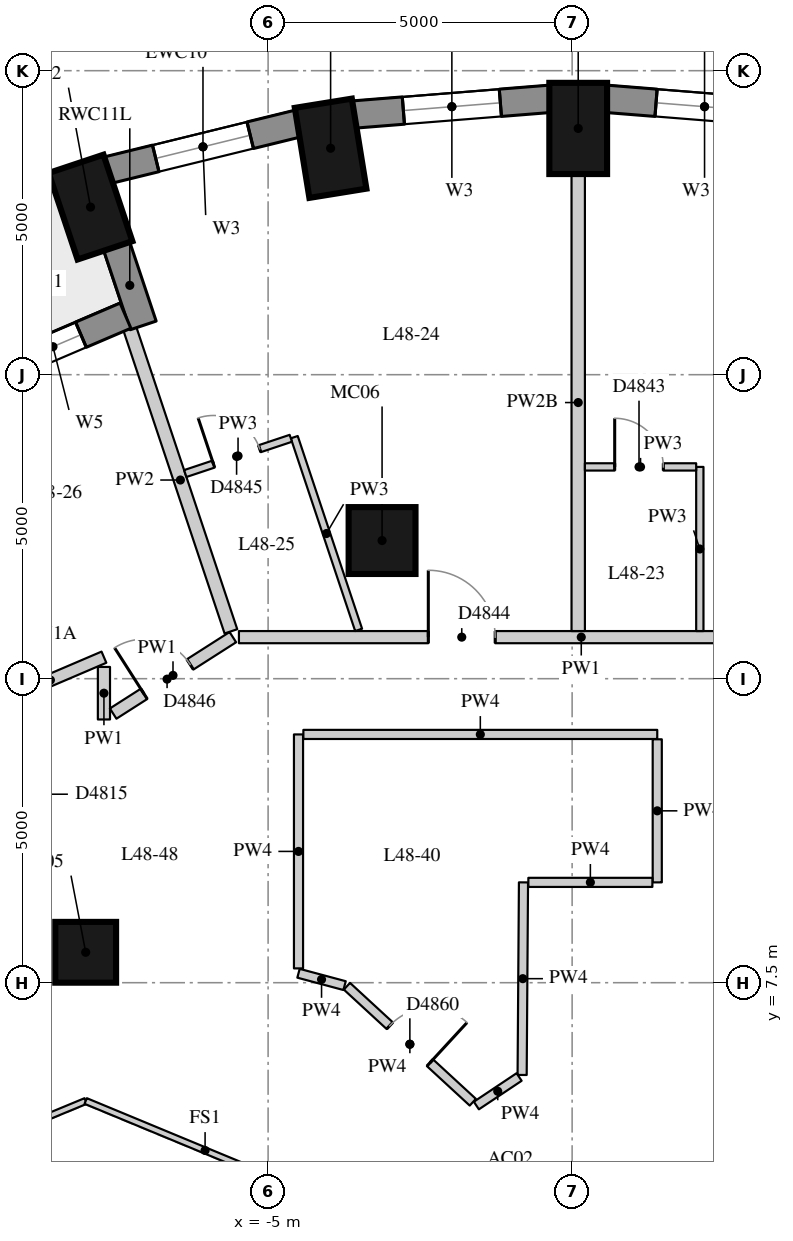
"""IFC4 building model, lengths in metres.
Left out: names, types, materials, properties, quantities, classifications, styles, units other than length and angle.
Written with IfcOpenShell. Run it as: python <this file> out.ifc"""

import sys

from ifc_helpers import new_model, si_unit, direction, frame, frame_2d, origin, origin_2d, place, context, subcontext, project, spatial, rectangle, extrude, element, fill, save


model = new_model("IFC4")
c1 = context("Model", 3, precision=1e-05, world=origin(), true_north=direction((0.0, 1.0)))
c2 = subcontext(c1, "Body", "Model", "MODEL_VIEW")
j1 = project(units=[si_unit("LENGTHUNIT", "METRE"), si_unit("PLANEANGLEUNIT", "RADIAN")], contexts=[c1])
p1 = place(None, origin())
s1 = spatial("IfcSite", under=j1, at=p1, CompositionType="ELEMENT")
p2 = place(p1, origin())
s2 = spatial("IfcBuilding", under=s1, at=p2, CompositionType="ELEMENT")
p3 = place(p2, frame((0.0, 0.0, 171.5)))
s3 = spatial("IfcBuildingStorey", under=s2, at=p3, CompositionType="ELEMENT", Elevation=171.5)
for number, where, z_axis, x_axis in (
    (1, (0.1, 21.55, 0.0), (0.0, 0.0, 1.0), (0.0, 1.0, 0.0)),
    (2, (-3.972, 21.224, 0.0), (0.0, 0.0, 1.0), (-0.16, 0.987, 0.0)),
    (3, (-7.92, 20.256, 0.0), (0.0, 0.0, 1.0), (-0.317, 0.949, 0.0)),
):
    element("IfcColumn", number, at=place(p3, frame(where, z_axis=z_axis, x_axis=x_axis)), inside=s3, PredefinedType="COLUMN", context=c2, shape_type="SweptSolid", body=[
        extrude(rectangle(XDim=1.5, YDim=0.95, at=origin_2d()), origin(), (0.0, 0.0, 1.0), 3.3),
    ])
p4 = place(p3, frame((-8.0, 8.0, 0.0), z_axis=(0.0, 0.0, 1.0), x_axis=(1.0, 0.0, 0.0)))
e4 = element("IfcColumn", 4, at=p4, inside=s3, PredefinedType="COLUMN", context=c2, shape_type="SweptSolid", body=[
    extrude(rectangle(XDim=1.0, YDim=1.0, at=origin_2d()), origin(), (0.0, 0.0, 1.0), 3.3),
])
p5 = place(p3, frame((-3.126, 14.772, 0.0), z_axis=(0.0, 0.0, 1.0), x_axis=(1.0, 0.0, 0.0)))
e5 = element("IfcColumn", 5, at=p5, inside=s3, PredefinedType="COLUMN", context=c2, shape_type="SweptSolid", body=[
    extrude(rectangle(XDim=1.1, YDim=1.1, at=origin_2d()), origin(), (0.0, 0.0, 1.0), 3.3),
])
p6 = place(p3, frame((3.801, 21.778, 0.0), z_axis=(0.0, 0.0, 1.0), x_axis=(-0.996812416891, 0.079780984773, 0.0)))
e6 = element("IfcWall", 6, at=p6, inside=s3, PredefinedType="SOLIDWALL", context=c2, shape_type="SweptSolid", body=[
    extrude(rectangle(XDim=3.256, YDim=0.45, at=frame_2d((1.628, 0.0))), origin(), (0.0, 0.0, 1.0), 3.02),
])
p7 = place(p6, frame((0.828, 0.0, 0.4)))
e7 = element("IfcOpeningElement", 7, at=p7, cuts=e6, PredefinedType="OPENING", context=c2, shape_type="SweptSolid", body=[
    extrude(rectangle(XDim=1.6, YDim=1.75, at=frame_2d((0.8, 0.875))), frame((0.0, 0.235, 0.0), z_axis=(0.0, -1.0, 0.0), x_axis=(1.0, 0.0, 0.0)), (0.0, 0.0, 1.0), 0.47),
])
p8 = place(p3, frame((-0.355, 22.038, 0.0), z_axis=(0.0, 0.0, 1.0), x_axis=(-0.996812416891, -0.079780984773, 0.0)))
e8 = element("IfcWall", 8, at=p8, inside=s3, PredefinedType="SOLIDWALL", context=c2, shape_type="SweptSolid", body=[
    extrude(rectangle(XDim=3.256, YDim=0.45, at=frame_2d((1.628, 0.0))), origin(), (0.0, 0.0, 1.0), 3.02),
])
p9 = place(p8, frame((0.828, 0.0, 0.4)))
e9 = element("IfcOpeningElement", 9, at=p9, cuts=e8, PredefinedType="OPENING", context=c2, shape_type="SweptSolid", body=[
    extrude(rectangle(XDim=1.6, YDim=1.75, at=frame_2d((0.8, 0.875))), frame((0.0, 0.235, 0.0), z_axis=(0.0, -1.0, 0.0), x_axis=(1.0, 0.0, 0.0)), (0.0, 0.0, 1.0), 0.47),
])
p10 = place(p3, frame((-4.499, 21.633, 0.0), z_axis=(0.0, 0.0, 1.0), x_axis=(-0.971232901476, -0.238131583563, 0.0)))
e10 = element("IfcWall", 10, at=p10, inside=s3, PredefinedType="SOLIDWALL", context=c2, shape_type="SweptSolid", body=[
    extrude(rectangle(XDim=3.237, YDim=0.45, at=frame_2d((1.618, 0.0))), origin(), (0.0, 0.0, 1.0), 3.02),
])
p11 = place(p10, frame((0.818, 0.0, 0.4)))
e11 = element("IfcOpeningElement", 11, at=p11, cuts=e10, PredefinedType="OPENING", context=c2, shape_type="SweptSolid", body=[
    extrude(rectangle(XDim=1.6, YDim=1.75, at=frame_2d((0.8, 0.875))), frame((0.0, 0.235, 0.0), z_axis=(0.0, -1.0, 0.0), x_axis=(1.0, 0.0, 0.0)), (0.0, 0.0, 1.0), 0.47),
])
p12 = place(p3, frame((-7.495, 19.629, 0.0), z_axis=(0.0, 0.0, 1.0), x_axis=(0.316754470825, -0.948507567293, 0.0)))
e12 = element("IfcWall", 12, at=p12, inside=s3, PredefinedType="SOLIDWALL", context=c2, shape_type="SweptSolid", body=[
    extrude(rectangle(XDim=1.39, YDim=0.45, at=frame_2d((0.695, 0.0))), origin(), (0.0, 0.0, 1.0), 3.02),
])
p13 = place(p3, frame((-7.345, 18.47, 0.0), z_axis=(0.0, 0.0, 1.0), x_axis=(-0.919454986573, -0.393195279304, 0.0)))
e13 = element("IfcWall", 13, at=p13, inside=s3, PredefinedType="SOLIDWALL", context=c2, shape_type="SweptSolid", body=[
    extrude(rectangle(XDim=3.745, YDim=0.45, at=frame_2d((1.872, 0.0))), origin(), (0.0, 0.0, 1.0), 3.02),
])
p14 = place(p13, frame((0.797, 0.0, 0.4)))
e14 = element("IfcOpeningElement", 14, at=p14, cuts=e13, PredefinedType="OPENING", context=c2, shape_type="SweptSolid", body=[
    extrude(rectangle(XDim=1.0, YDim=1.75, at=frame_2d((0.5, 0.875))), frame((0.0, 0.235, 0.0), z_axis=(0.0, -1.0, 0.0), x_axis=(1.0, 0.0, 0.0)), (0.0, 0.0, 1.0), 0.47),
])
p15 = place(p13, frame((1.947, 0.0, 0.0)))
e15 = element("IfcOpeningElement", 15, at=p15, cuts=e13, PredefinedType="OPENING", context=c2, shape_type="SweptSolid", body=[
    extrude(rectangle(XDim=1.0, YDim=2.15, at=frame_2d((0.5, 1.075))), frame((0.0, 0.235, 0.0), z_axis=(0.0, -1.0, 0.0), x_axis=(1.0, 0.0, 0.0)), (0.0, 0.0, 1.0), 0.47),
])
p16 = place(p3, frame((-9.46, 12.101, 0.0), z_axis=(0.0, 0.0, 1.0), x_axis=(0.919441549003, 0.393226700475, 0.0)))
e16 = element("IfcWall", 16, at=p16, inside=s3, PredefinedType="PARTITIONING", context=c2, shape_type="SweptSolid", body=[
    extrude(rectangle(XDim=1.915, YDim=0.2, at=frame_2d((0.958, 0.0))), origin(), (0.0, 0.0, 1.0), 2.57),
])
p17 = place(p3, frame((-7.7, 12.693, 0.0), z_axis=(0.0, 0.0, 1.0), x_axis=(0.0, -1.0, 0.0)))
e17 = element("IfcWall", 17, at=p17, inside=s3, PredefinedType="PARTITIONING", context=c2, shape_type="SweptSolid", body=[
    extrude(rectangle(XDim=0.864, YDim=0.2, at=frame_2d((0.432, 0.0))), origin(), (0.0, 0.0, 1.0), 3.02),
])
p18 = place(p3, frame((-7.548, 11.926, 0.0), z_axis=(0.0, 0.0, 1.0), x_axis=(0.842760799664, 0.538288244855, 0.0)))
e18 = element("IfcWall", 18, at=p18, inside=s3, PredefinedType="PARTITIONING", context=c2, shape_type="SweptSolid", body=[
    extrude(rectangle(XDim=2.336, YDim=0.2, at=frame_2d((1.168, 0.0))), origin(), (0.0, 0.0, 1.0), 3.02),
])
p19 = place(p18, frame((0.602, 0.0, 0.0)))
e19 = element("IfcOpeningElement", 19, at=p19, cuts=e18, PredefinedType="OPENING", context=c2, shape_type="SweptSolid", body=[
    extrude(rectangle(XDim=0.9, YDim=2.1, at=frame_2d((0.45, 1.05))), frame((0.0, 0.11, 0.0), z_axis=(0.0, -1.0, 0.0), x_axis=(1.0, 0.0, 0.0)), (0.0, 0.0, 1.0), 0.22),
])
p20 = place(p3, frame((-5.48, 13.183, 0.0), z_axis=(0.0, 0.0, 1.0), x_axis=(1.0, 0.0, 0.0)))
e20 = element("IfcWall", 20, at=p20, inside=s3, PredefinedType="PARTITIONING", context=c2, shape_type="SweptSolid", body=[
    extrude(rectangle(XDim=11.26, YDim=0.2, at=frame_2d((5.63, 0.0))), origin(), (0.0, 0.0, 1.0), 3.02),
])
p21 = place(p20, frame((9.368, 0.0, 0.0)))
e21 = element("IfcOpeningElement", 21, at=p21, cuts=e20, PredefinedType="OPENING", context=c2, shape_type="SweptSolid", body=[
    extrude(rectangle(XDim=1.1, YDim=2.1, at=frame_2d((0.55, 1.05))), frame((0.0, 0.11, 0.0), z_axis=(0.0, -1.0, 0.0), x_axis=(1.0, 0.0, 0.0)), (0.0, 0.0, 1.0), 0.22),
])
p22 = place(p20, frame((3.115, 0.0, 0.0)))
e22 = element("IfcOpeningElement", 22, at=p22, cuts=e20, PredefinedType="OPENING", context=c2, shape_type="SweptSolid", body=[
    extrude(rectangle(XDim=1.1, YDim=2.1, at=frame_2d((0.55, 1.05))), frame((0.0, 0.11, 0.0), z_axis=(0.0, -1.0, 0.0), x_axis=(1.0, 0.0, 0.0)), (0.0, 0.0, 1.0), 0.22),
])
p23 = place(p3, frame((-0.8, 9.15, 0.0), z_axis=(0.0, 0.0, 1.0), x_axis=(-0.007013855529, -0.999975402613, 0.0)))
e23 = element("IfcWall", 23, at=p23, inside=s3, PredefinedType="PARTITIONING", context=c2, shape_type="SweptSolid", body=[
    extrude(rectangle(XDim=3.167, YDim=0.15, at=frame_2d((1.584, 0.0))), origin(), (0.0, 0.0, 1.0), 3.02),
])
p24 = place(p3, frame((-0.872, 5.949, 0.0), z_axis=(0.0, 0.0, 1.0), x_axis=(-0.831694574928, -0.555233405006, 0.0)))
e24 = element("IfcWall", 24, at=p24, inside=s3, PredefinedType="PARTITIONING", context=c2, shape_type="SweptSolid", body=[
    extrude(rectangle(XDim=0.845, YDim=0.15, at=frame_2d((0.423, 0.0))), origin(), (0.0, 0.0, 1.0), 3.02),
])
p25 = place(p3, frame((-1.634, 5.534, 0.0), z_axis=(0.0, 0.0, 1.0), x_axis=(-0.735398368623, 0.67763503409, 0.0)))
e25 = element("IfcWall", 25, at=p25, inside=s3, PredefinedType="PARTITIONING", context=c2, shape_type="SweptSolid", body=[
    extrude(rectangle(XDim=2.815, YDim=0.15, at=frame_2d((1.407, 0.0))), origin(), (0.0, 0.0, 1.0), 3.02),
])
p26 = place(p25, frame((0.958, 0.0, 0.0)))
e26 = element("IfcOpeningElement", 26, at=p26, cuts=e25, PredefinedType="OPENING", context=c2, shape_type="SweptSolid", body=[
    extrude(rectangle(XDim=0.9, YDim=2.1, at=frame_2d((0.45, 1.05))), frame((0.0, 0.085, 0.0), z_axis=(0.0, -1.0, 0.0), x_axis=(1.0, 0.0, 0.0)), (0.0, 0.0, 1.0), 0.17),
])
p27 = place(p3, frame((-3.742, 7.452, 0.0), z_axis=(0.0, 0.0, 1.0), x_axis=(-0.965903596155, 0.258901994846, 0.0)))
e27 = element("IfcWall", 27, at=p27, inside=s3, PredefinedType="PARTITIONING", context=c2, shape_type="SweptSolid", body=[
    extrude(rectangle(XDim=0.785, YDim=0.15, at=frame_2d((0.392, 0.0))), origin(), (0.0, 0.0, 1.0), 3.02),
])
p28 = place(p3, frame((-4.5, 7.735, 0.0), z_axis=(0.0, 0.0, 1.0), x_axis=(0.0, 1.0, 0.0)))
e28 = element("IfcWall", 28, at=p28, inside=s3, PredefinedType="PARTITIONING", context=c2, shape_type="SweptSolid", body=[
    extrude(rectangle(XDim=3.848, YDim=0.15, at=frame_2d((1.924, 0.0))), origin(), (0.0, 0.0, 1.0), 3.02),
])
p29 = place(p3, frame((-4.42, 11.583, 0.0), z_axis=(0.0, 0.0, 1.0), x_axis=(1.0, 0.0, 0.0)))
e29 = element("IfcWall", 29, at=p29, inside=s3, PredefinedType="PARTITIONING", context=c2, shape_type="SweptSolid", body=[
    extrude(rectangle(XDim=5.82, YDim=0.15, at=frame_2d((2.91, 0.0))), origin(), (0.0, 0.0, 1.0), 3.02),
])
p30 = place(p3, frame((1.4, 11.503, 0.0), z_axis=(0.0, 0.0, 1.0), x_axis=(0.0, -1.0, 0.0)))
e30 = element("IfcWall", 30, at=p30, inside=s3, PredefinedType="PARTITIONING", context=c2, shape_type="SweptSolid", body=[
    extrude(rectangle(XDim=2.353, YDim=0.15, at=frame_2d((1.177, 0.0))), origin(), (0.0, 0.0, 1.0), 3.02),
])
p31 = place(p3, frame((1.32, 9.15, 0.0), z_axis=(0.0, 0.0, 1.0), x_axis=(-1.0, 0.0, 0.0)))
e31 = element("IfcWall", 31, at=p31, inside=s3, PredefinedType="PARTITIONING", context=c2, shape_type="SweptSolid", body=[
    extrude(rectangle(XDim=2.04, YDim=0.15, at=frame_2d((1.02, 0.0))), origin(), (0.0, 0.0, 1.0), 3.02),
])
p32 = place(p3, frame((0.1, 20.8, 0.0), z_axis=(0.0, 0.0, 1.0), x_axis=(0.0, -1.0, 0.0)))
e32 = element("IfcWall", 32, at=p32, inside=s3, PredefinedType="PARTITIONING", context=c2, shape_type="SweptSolid", body=[
    extrude(rectangle(XDim=7.517, YDim=0.22, at=frame_2d((3.758, 0.0))), origin(), (0.0, 0.0, 1.0), 2.57),
])
p33 = place(p3, frame((-7.274, 18.256, 0.0), z_axis=(0.0, 0.0, 1.0), x_axis=(0.316758050248, -0.948506371936, 0.0)))
e33 = element("IfcWall", 33, at=p33, inside=s3, PredefinedType="PARTITIONING", context=c2, shape_type="SweptSolid", body=[
    extrude(rectangle(XDim=5.248, YDim=0.22, at=frame_2d((2.624, 0.0))), origin(), (0.0, 0.0, 1.0), 3.02),
])
p34 = place(p3, frame((2.1, 13.283, 0.0), z_axis=(0.0, 0.0, 1.0), x_axis=(0.0, 1.0, 0.0)))
e34 = element("IfcWall", 34, at=p34, inside=s3, PredefinedType="PARTITIONING", context=c2, shape_type="SweptSolid", body=[
    extrude(rectangle(XDim=2.7, YDim=0.12, at=frame_2d((1.35, 0.0))), origin(), (0.0, 0.0, 1.0), 3.02),
])
p35 = place(p3, frame((-3.511, 13.302, 0.0), z_axis=(0.0, 0.0, 1.0), x_axis=(-0.316666024344, 0.948537099447, 0.0)))
e35 = element("IfcWall", 35, at=p35, inside=s3, PredefinedType="PARTITIONING", context=c2, shape_type="SweptSolid", body=[
    extrude(rectangle(XDim=3.342, YDim=0.12, at=frame_2d((1.671, 0.0))), origin(), (0.0, 0.0, 1.0), 3.02),
])
p36 = place(p3, frame((2.04, 15.983, 0.0), z_axis=(0.0, 0.0, 1.0), x_axis=(-1.0, 0.0, 0.0)))
e36 = element("IfcWall", 36, at=p36, inside=s3, PredefinedType="PARTITIONING", context=c2, shape_type="SweptSolid", body=[
    extrude(rectangle(XDim=1.83, YDim=0.12, at=frame_2d((0.915, 0.0))), origin(), (0.0, 0.0, 1.0), 3.02),
])
p37 = place(p36, frame((0.54, 0.0, 0.0)))
e37 = element("IfcOpeningElement", 37, at=p37, cuts=e36, PredefinedType="OPENING", context=c2, shape_type="SweptSolid", body=[
    extrude(rectangle(XDim=0.8, YDim=2.1, at=frame_2d((0.4, 1.05))), frame((0.0, 0.07, 0.0), z_axis=(0.0, -1.0, 0.0), x_axis=(1.0, 0.0, 0.0)), (0.0, 0.0, 1.0), 0.14),
])
p38 = place(p3, frame((-4.626, 16.454, 0.0), z_axis=(0.0, 0.0, 1.0), x_axis=(-0.9485230882, -0.31670799035, 0.0)))
e38 = element("IfcWall", 38, at=p38, inside=s3, PredefinedType="PARTITIONING", context=c2, shape_type="SweptSolid", body=[
    extrude(rectangle(XDim=1.83, YDim=0.12, at=frame_2d((0.915, 0.0))), origin(), (0.0, 0.0, 1.0), 3.02),
])
p39 = place(p38, frame((0.54, 0.0, 0.0)))
e39 = element("IfcOpeningElement", 39, at=p39, cuts=e38, PredefinedType="OPENING", context=c2, shape_type="SweptSolid", body=[
    extrude(rectangle(XDim=0.8, YDim=2.1, at=frame_2d((0.4, 1.05))), frame((0.0, 0.07, 0.0), z_axis=(0.0, -1.0, 0.0), x_axis=(1.0, 0.0, 0.0)), (0.0, 0.0, 1.0), 0.14),
])
for number, where, z_axis, x_axis in (
    (40, (-11.927, 3.927, 0.0), (0.0, 0.0, 1.0), (0.924, 0.383, 0.0)),
    (41, (-8.0, 5.554, 0.0), (0.0, 0.0, 1.0), (0.924, -0.383, 0.0)),
):
    element("IfcWall", number, at=place(p3, frame(where, z_axis=z_axis, x_axis=x_axis)), inside=s3, PredefinedType="PARTITIONING", context=c2, shape_type="SweptSolid", body=[
        extrude(rectangle(XDim=4.251, YDim=0.1, at=frame_2d((2.125, 0.0))), origin(), (0.0, 0.0, 1.0), 3.02),
    ])
p40 = place(p7, origin())
e42 = element("IfcWindow", 42, at=p40, inside=s3, PartitioningType="SINGLE_PANEL", PredefinedType="WINDOW", context=c2, shape_type="SweptSolid", body=[
    extrude(rectangle(XDim=1.6, YDim=1.75, at=frame_2d((0.8, 0.875))), frame((0.0, 0.035, 0.0), z_axis=(0.0, -1.0, 0.0), x_axis=(1.0, 0.0, 0.0)), (0.0, 0.0, 1.0), 0.06),
])
fill(e7, e42)
p41 = place(p9, origin())
e43 = element("IfcWindow", 43, at=p41, inside=s3, PartitioningType="SINGLE_PANEL", PredefinedType="WINDOW", context=c2, shape_type="SweptSolid", body=[
    extrude(rectangle(XDim=1.6, YDim=1.75, at=frame_2d((0.8, 0.875))), frame((0.0, 0.035, 0.0), z_axis=(0.0, -1.0, 0.0), x_axis=(1.0, 0.0, 0.0)), (0.0, 0.0, 1.0), 0.06),
])
fill(e9, e43)
p42 = place(p11, origin())
e44 = element("IfcWindow", 44, at=p42, inside=s3, PartitioningType="SINGLE_PANEL", PredefinedType="WINDOW", context=c2, shape_type="SweptSolid", body=[
    extrude(rectangle(XDim=1.6, YDim=1.75, at=frame_2d((0.8, 0.875))), frame((0.0, 0.035, 0.0), z_axis=(0.0, -1.0, 0.0), x_axis=(1.0, 0.0, 0.0)), (0.0, 0.0, 1.0), 0.06),
])
fill(e11, e44)
p43 = place(p14, origin())
e45 = element("IfcWindow", 45, at=p43, inside=s3, PartitioningType="SINGLE_PANEL", PredefinedType="WINDOW", context=c2, shape_type="SweptSolid", body=[
    extrude(rectangle(XDim=1.0, YDim=1.75, at=frame_2d((0.5, 0.875))), frame((0.0, 0.035, 0.0), z_axis=(0.0, -1.0, 0.0), x_axis=(1.0, 0.0, 0.0)), (0.0, 0.0, 1.0), 0.06),
])
fill(e14, e45)
p44 = place(p37, origin())
e46 = element("IfcDoor", 46, at=p44, inside=s3, OperationType="SINGLE_SWING_LEFT", PredefinedType="DOOR", context=c2, shape_type="SweptSolid", body=[
    extrude(rectangle(XDim=0.8, YDim=2.1, at=frame_2d((0.4, 1.05))), frame((0.0, 0.025, 0.0), z_axis=(0.0, -1.0, 0.0), x_axis=(1.0, 0.0, 0.0)), (0.0, 0.0, 1.0), 0.05),
])
fill(e37, e46)
p45 = place(p22, origin())
e47 = element("IfcDoor", 47, at=p45, inside=s3, OperationType="SINGLE_SWING_LEFT", PredefinedType="DOOR", context=c2, shape_type="SweptSolid", body=[
    extrude(rectangle(XDim=1.1, YDim=2.1, at=frame_2d((0.55, 1.05))), frame((0.0, 0.025, 0.0), z_axis=(0.0, -1.0, 0.0), x_axis=(1.0, 0.0, 0.0)), (0.0, 0.0, 1.0), 0.05),
])
fill(e22, e47)
p46 = place(p39, origin())
e48 = element("IfcDoor", 48, at=p46, inside=s3, OperationType="SINGLE_SWING_LEFT", PredefinedType="DOOR", context=c2, shape_type="SweptSolid", body=[
    extrude(rectangle(XDim=0.8, YDim=2.1, at=frame_2d((0.4, 1.05))), frame((0.0, 0.025, 0.0), z_axis=(0.0, -1.0, 0.0), x_axis=(1.0, 0.0, 0.0)), (0.0, 0.0, 1.0), 0.05),
])
fill(e39, e48)
p47 = place(p19, origin())
e49 = element("IfcDoor", 49, at=p47, inside=s3, OperationType="SINGLE_SWING_LEFT", PredefinedType="DOOR", context=c2, shape_type="SweptSolid", body=[
    extrude(rectangle(XDim=0.9, YDim=2.1, at=frame_2d((0.45, 1.05))), frame((0.0, 0.025, 0.0), z_axis=(0.0, -1.0, 0.0), x_axis=(1.0, 0.0, 0.0)), (0.0, 0.0, 1.0), 0.05),
])
fill(e19, e49)
p48 = place(p26, origin())
e50 = element("IfcDoor", 50, at=p48, inside=s3, OperationType="SINGLE_SWING_RIGHT", PredefinedType="DOOR", context=c2, shape_type="SweptSolid", body=[
    extrude(rectangle(XDim=0.9, YDim=2.1, at=frame_2d((0.45, 1.05))), frame((0.0, 0.025, 0.0), z_axis=(0.0, -1.0, 0.0), x_axis=(1.0, 0.0, 0.0)), (0.0, 0.0, 1.0), 0.05),
])
fill(e26, e50)
save(model, sys.argv[1])
